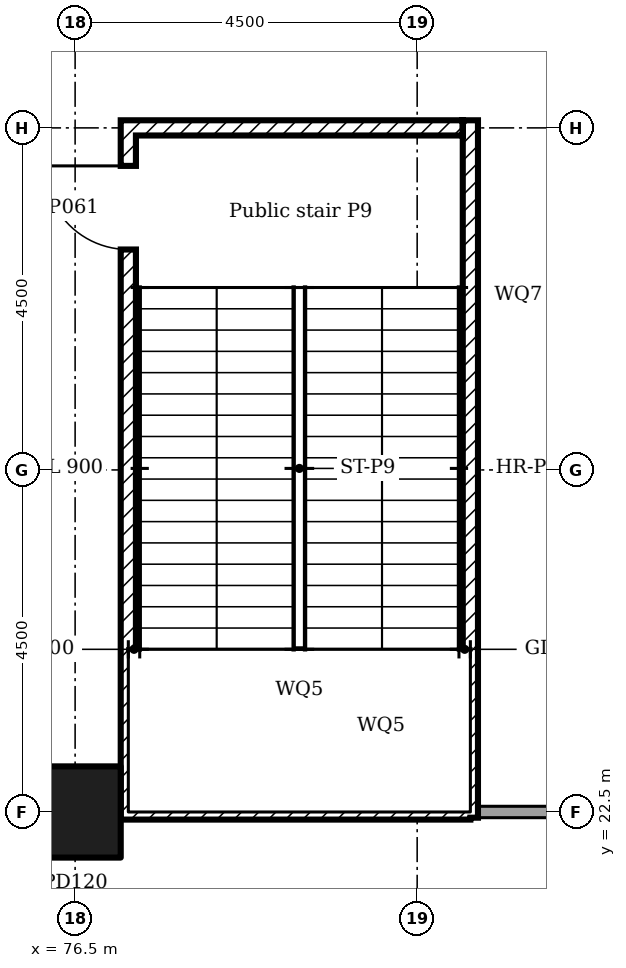
"""IFC4 building model, lengths in metres.
Left out: names, types, materials, properties, quantities, classifications, styles, units other than length and angle.
Written with IfcOpenShell. Run it as: python <this file> out.ifc"""

import sys

from ifc_helpers import new_model, si_unit, direction, frame, frame_2d, origin, origin_2d, place, context, subcontext, project, spatial, rectangle, extrude, element, fill, save


model = new_model("IFC4")
c1 = context("Model", 3, precision=1e-05, world=origin(), true_north=direction((0.0, 1.0)))
c2 = subcontext(c1, "Body", "Model", "MODEL_VIEW")
j1 = project(units=[si_unit("LENGTHUNIT", "METRE"), si_unit("PLANEANGLEUNIT", "RADIAN")], contexts=[c1])
p1 = place(None, origin())
s1 = spatial("IfcSite", under=j1, at=p1, CompositionType="ELEMENT")
p2 = place(p1, origin())
s2 = spatial("IfcBuilding", under=s1, at=p2, CompositionType="ELEMENT")
p3 = place(p2, origin())
s3 = spatial("IfcBuildingStorey", under=s2, at=p3, CompositionType="ELEMENT", Elevation=0.0)
p4 = place(p3, frame((76.5, 22.5, 0.0)))
e1 = element("IfcColumn", 1, at=p4, inside=s3, PredefinedType="COLUMN", context=c2, shape_type="SweptSolid", body=[
    extrude(rectangle(XDim=1.2, YDim=1.2, at=origin_2d()), origin(), (0.0, 0.0, 1.0), 6.0),
])
p5 = place(p3, frame((81.8, 22.5, 0.0)))
e2 = element("IfcWall", 2, at=p5, inside=s3, PredefinedType="PARTITIONING", context=c2, shape_type="SweptSolid", body=[
    extrude(rectangle(XDim=7.605, YDim=0.15, at=frame_2d((3.802, 0.0))), origin(), (0.0, 0.0, 1.0), 5.55),
])
p6 = place(p5, frame((2.85, 0.0, 0.0)))
e3 = element("IfcOpeningElement", 3, at=p6, cuts=e2, PredefinedType="OPENING", context=c2, shape_type="SweptSolid", body=[
    extrude(rectangle(XDim=1.8, YDim=2.1, at=frame_2d((0.9, 1.05))), frame((0.0, 0.085, 0.0), z_axis=(0.0, -1.0, 0.0), x_axis=(1.0, 0.0, 0.0)), (0.0, 0.0, 1.0), 0.17),
])
p7 = place(p3, frame((77.1, 22.5, 0.0)))
e4 = element("IfcWall", 4, at=p7, inside=s3, PredefinedType="SOLIDWALL", context=c2, shape_type="SweptSolid", body=[
    extrude(rectangle(XDim=4.6, YDim=0.2, at=frame_2d((2.3, 0.0))), origin(), (0.0, 0.0, 1.0), 5.55),
])
p8 = place(p3, frame((77.2, 22.6, 0.0), z_axis=(0.0, 0.0, 1.0), x_axis=(0.0, 1.0, 0.0)))
e5 = element("IfcWall", 5, at=p8, inside=s3, PredefinedType="SOLIDWALL", context=c2, shape_type="SweptSolid", body=[
    extrude(rectangle(XDim=9.0, YDim=0.2, at=frame_2d((4.5, 0.0))), origin(), (0.0, 0.0, 1.0), 5.55),
])
p9 = place(p8, frame((7.3, 0.0, 0.0)))
e6 = element("IfcOpeningElement", 6, at=p9, cuts=e5, PredefinedType="OPENING", context=c2, shape_type="SweptSolid", body=[
    extrude(rectangle(XDim=1.1, YDim=2.1, at=frame_2d((0.55, 1.05))), frame((0.0, 0.11, 0.0), z_axis=(0.0, -1.0, 0.0), x_axis=(1.0, 0.0, 0.0)), (0.0, 0.0, 1.0), 0.22),
])
p10 = place(p3, frame((81.7, 22.425, 0.0), z_axis=(0.0, 0.0, 1.0), x_axis=(0.0, 1.0, 0.0)))
e7 = element("IfcWall", 7, at=p10, inside=s3, PredefinedType="SOLIDWALL", context=c2, shape_type="SweptSolid", body=[
    extrude(rectangle(XDim=9.175, YDim=0.2, at=frame_2d((4.587, 0.0))), origin(), (0.0, 0.0, 1.0), 5.55),
])
p11 = place(p3, frame((77.3, 31.5, 0.0)))
e8 = element("IfcWall", 8, at=p11, inside=s3, PredefinedType="SOLIDWALL", context=c2, shape_type="SweptSolid", body=[
    extrude(rectangle(XDim=4.3, YDim=0.2, at=frame_2d((2.15, 0.0))), origin(), (0.0, 0.0, 1.0), 5.55),
])
for number, where, z_axis, x_axis in (
    (9, (81.6, 24.54, 0.0), (0.0, 0.0, 1.0), (-1.0, 0.0, 0.0)),
    (10, (81.6, 23.2, 0.0), (0.0, 0.0, 1.0), (-1.0, 0.0, 0.0)),
):
    element("IfcWall", number, at=place(p3, frame(where, z_axis=z_axis, x_axis=x_axis)), inside=s3, PredefinedType="SOLIDWALL", context=c2, shape_type="SweptSolid", body=[
        extrude(rectangle(XDim=4.3, YDim=0.2, at=frame_2d((2.15, 0.0))), origin(), (0.0, 0.0, 1.0), 2.8),
    ])
p12 = place(p9, origin())
e11 = element("IfcDoor", 11, at=p12, inside=s3, OperationType="SINGLE_SWING_LEFT", PredefinedType="DOOR", context=c2, shape_type="SweptSolid", body=[
    extrude(rectangle(XDim=1.1, YDim=2.1, at=frame_2d((0.55, 1.05))), frame((0.0, 0.025, 0.0), z_axis=(0.0, -1.0, 0.0), x_axis=(1.0, 0.0, 0.0)), (0.0, 0.0, 1.0), 0.05),
])
fill(e6, e11)
save(model, sys.argv[1])
